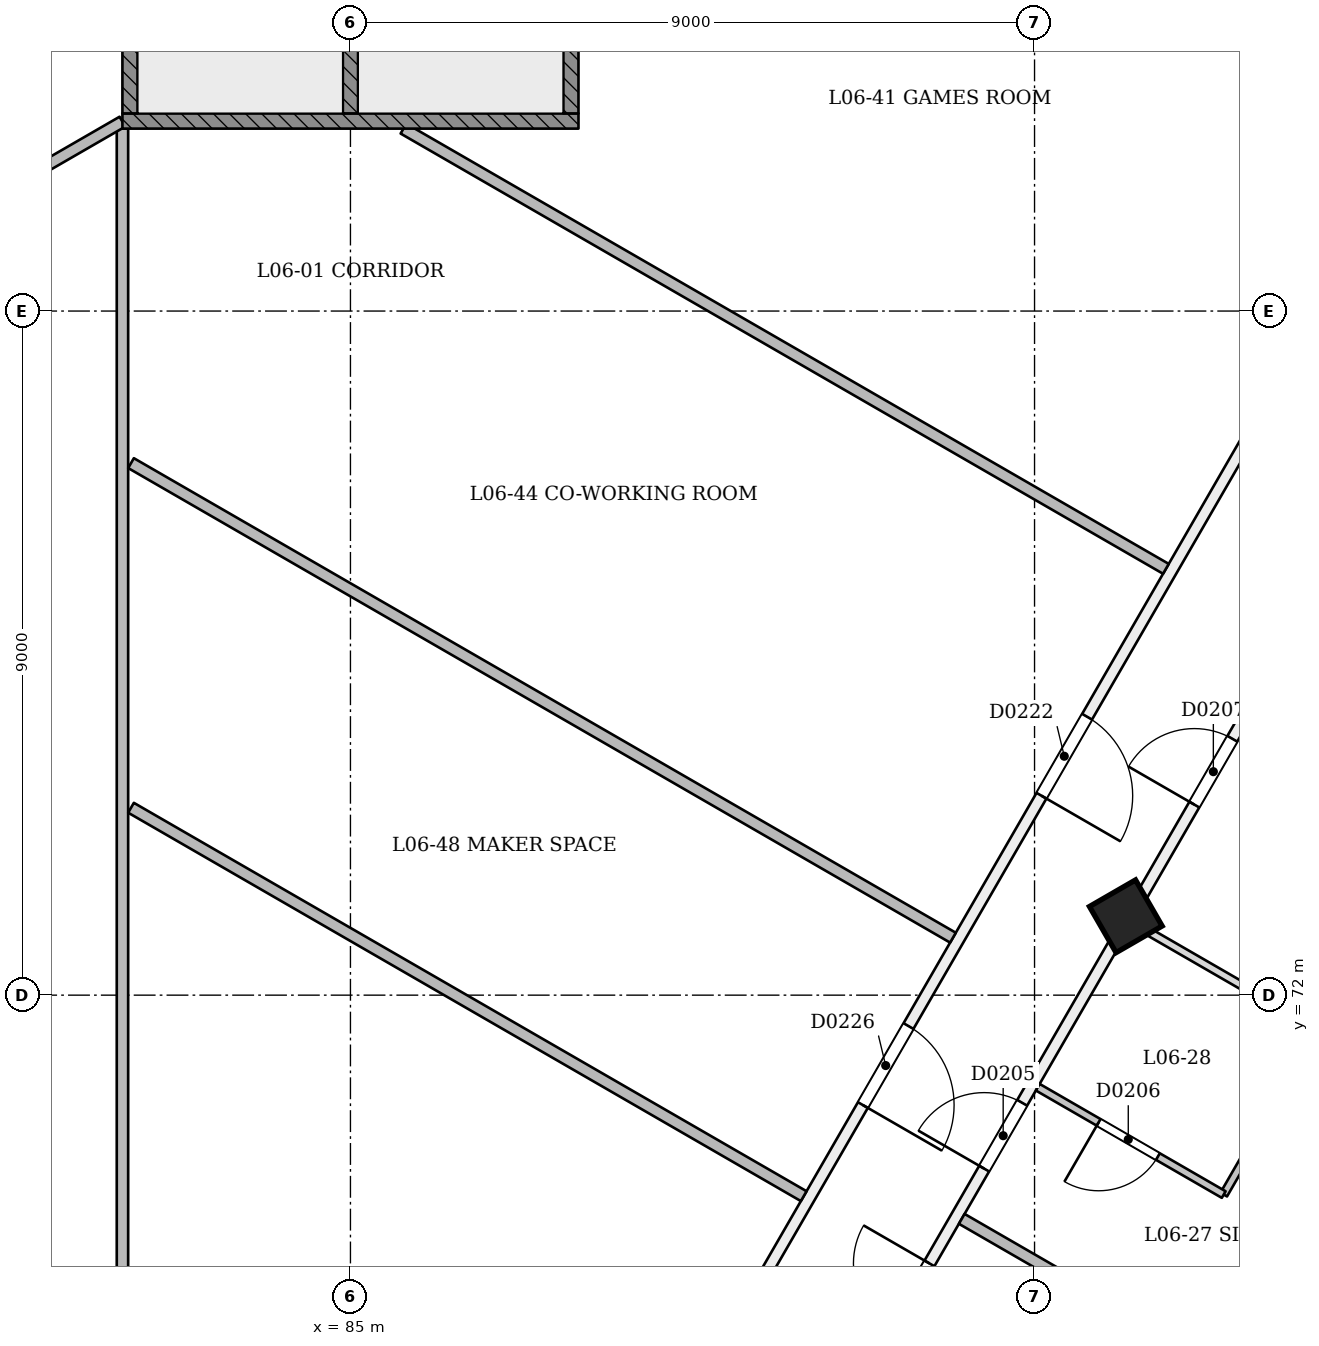
"""IFC4 building model, lengths in metres.
Left out: names, types, materials, properties, quantities, classifications, styles, units other than length and angle.
Written with IfcOpenShell. Run it as: python <this file> out.ifc"""

import sys

from ifc_helpers import new_model, si_unit, direction, frame, frame_2d, origin, origin_2d, place, context, subcontext, project, spatial, rectangle, extrude, element, fill, save


model = new_model("IFC4")
c1 = context("Model", 3, precision=1e-05, world=origin(), true_north=direction((0.0, 1.0)))
c2 = subcontext(c1, "Body", "Model", "MODEL_VIEW")
j1 = project(units=[si_unit("LENGTHUNIT", "METRE"), si_unit("PLANEANGLEUNIT", "RADIAN")], contexts=[c1])
p1 = place(None, origin())
s1 = spatial("IfcSite", under=j1, at=p1, CompositionType="ELEMENT")
p2 = place(p1, origin())
s2 = spatial("IfcBuilding", under=s1, at=p2, CompositionType="ELEMENT")
p3 = place(p2, frame((0.0, 0.0, 30.6)))
s3 = spatial("IfcBuildingStorey", under=s2, at=p3, CompositionType="ELEMENT", Elevation=30.6)
p4 = place(p3, frame((95.228, 72.991, -0.021), z_axis=(-0.02215519141, 0.038415882353, 0.999016199807), x_axis=(-0.500657429676, -0.865361475843, 0.022173277538)))
e1 = element("IfcColumn", 1, at=p4, inside=s3, PredefinedType="COLUMN", context=c2, shape_type="SweptSolid", body=[
    extrude(rectangle(XDim=0.7, YDim=0.7, at=origin_2d()), origin(), (0.0, 0.0, 1.0), 3.604),
])
p5 = place(p3, frame((61.273, 96.374, 0.0), z_axis=(0.0, 0.0, 1.0), x_axis=(0.5000018851, -0.866024315419, 0.0)))
e2 = element("IfcWall", 2, at=p5, inside=s3, PredefinedType="PARTITIONING", context=c2, shape_type="SweptSolid", body=[
    extrude(rectangle(XDim=45.0, YDim=0.15, at=frame_2d((22.5, 0.0))), origin(), (0.0, 0.0, 1.0), 2.7),
])
p6 = place(p5, frame((2.829, 0.0, 0.0)))
e3 = element("IfcOpeningElement", 3, at=p6, cuts=e2, PredefinedType="OPENING", context=c2, shape_type="SweptSolid", body=[
    extrude(rectangle(XDim=1.1, YDim=2.1, at=frame_2d((0.55, 1.05))), frame((0.0, 0.085, 0.0), z_axis=(0.0, -1.0, 0.0), x_axis=(1.0, 0.0, 0.0)), (0.0, 0.0, 1.0), 0.171),
])
p7 = place(p5, frame((7.3, 0.0, 0.0)))
e4 = element("IfcOpeningElement", 4, at=p7, cuts=e2, PredefinedType="OPENING", context=c2, shape_type="SweptSolid", body=[
    extrude(rectangle(XDim=1.2, YDim=2.1, at=frame_2d((0.6, 1.05))), frame((0.0, 0.085, 0.0), z_axis=(0.0, -1.0, 0.0), x_axis=(1.0, 0.0, 0.0)), (0.0, 0.0, 1.0), 0.171),
])
p8 = place(p5, frame((14.22, 0.0, 0.0)))
e5 = element("IfcOpeningElement", 5, at=p8, cuts=e2, PredefinedType="OPENING", context=c2, shape_type="SweptSolid", body=[
    extrude(rectangle(XDim=1.0, YDim=2.1, at=frame_2d((0.5, 1.05))), frame((0.0, 0.085, 0.0), z_axis=(0.0, -1.0, 0.0), x_axis=(1.0, 0.0, 0.0)), (0.0, 0.0, 1.0), 0.171),
])
p9 = place(p5, frame((20.895, 0.0, 0.0)))
e6 = element("IfcOpeningElement", 6, at=p9, cuts=e2, PredefinedType="OPENING", context=c2, shape_type="SweptSolid", body=[
    extrude(rectangle(XDim=1.0, YDim=2.1, at=frame_2d((0.5, 1.05))), frame((0.0, 0.085, 0.0), z_axis=(0.0, -1.0, 0.0), x_axis=(1.0, 0.0, 0.0)), (0.0, 0.0, 1.0), 0.171),
])
p10 = place(p5, frame((24.25, 0.0, 0.0)))
e7 = element("IfcOpeningElement", 7, at=p10, cuts=e2, PredefinedType="OPENING", context=c2, shape_type="SweptSolid", body=[
    extrude(rectangle(XDim=1.0, YDim=2.1, at=frame_2d((0.5, 1.05))), frame((0.0, 0.085, 0.0), z_axis=(0.0, -1.0, 0.0), x_axis=(1.0, 0.0, 0.0)), (0.0, 0.0, 1.0), 0.171),
])
p11 = place(p5, frame((29.78, 0.0, 0.0)))
e8 = element("IfcOpeningElement", 8, at=p11, cuts=e2, PredefinedType="OPENING", context=c2, shape_type="SweptSolid", body=[
    extrude(rectangle(XDim=1.0, YDim=2.1, at=frame_2d((0.5, 1.05))), frame((0.0, 0.085, 0.0), z_axis=(0.0, -1.0, 0.0), x_axis=(1.0, 0.0, 0.0)), (0.0, 0.0, 1.0), 0.171),
])
p12 = place(p5, frame((34.3, 0.0, 0.0)))
e9 = element("IfcOpeningElement", 9, at=p12, cuts=e2, PredefinedType="OPENING", context=c2, shape_type="SweptSolid", body=[
    extrude(rectangle(XDim=1.2, YDim=2.1, at=frame_2d((0.6, 1.05))), frame((0.0, 0.085, 0.0), z_axis=(0.0, -1.0, 0.0), x_axis=(1.0, 0.0, 0.0)), (0.0, 0.0, 1.0), 0.171),
])
p13 = place(p5, frame((41.22, 0.0, 0.0)))
e10 = element("IfcOpeningElement", 10, at=p13, cuts=e2, PredefinedType="OPENING", context=c2, shape_type="SweptSolid", body=[
    extrude(rectangle(XDim=1.0, YDim=2.1, at=frame_2d((0.5, 1.05))), frame((0.0, 0.085, 0.0), z_axis=(0.0, -1.0, 0.0), x_axis=(1.0, 0.0, 0.0)), (0.0, 0.0, 1.0), 0.171),
])
p14 = place(p3, frame((86.227, 57.403, 0.0), z_axis=(0.0, 0.0, 1.0), x_axis=(0.5000018851, 0.866024315419, 0.0)))
e11 = element("IfcWall", 11, at=p14, inside=s3, PredefinedType="PARTITIONING", context=c2, shape_type="SweptSolid", body=[
    extrude(rectangle(XDim=45.0, YDim=0.15, at=frame_2d((22.5, 0.0))), origin(), (0.0, 0.0, 1.0), 2.7),
])
p15 = place(p14, frame((0.72, 0.0, 0.0)))
e12 = element("IfcOpeningElement", 12, at=p15, cuts=e11, PredefinedType="OPENING", context=c2, shape_type="SweptSolid", body=[
    extrude(rectangle(XDim=1.0, YDim=2.1, at=frame_2d((0.5, 1.05))), frame((0.0, 0.085, 0.0), z_axis=(0.0, -1.0, 0.0), x_axis=(1.0, 0.0, 0.0)), (0.0, 0.0, 1.0), 0.171),
])
p16 = place(p14, frame((5.22, 0.0, 0.0)))
e13 = element("IfcOpeningElement", 13, at=p16, cuts=e11, PredefinedType="OPENING", context=c2, shape_type="SweptSolid", body=[
    extrude(rectangle(XDim=1.0, YDim=2.1, at=frame_2d((0.5, 1.05))), frame((0.0, 0.085, 0.0), z_axis=(0.0, -1.0, 0.0), x_axis=(1.0, 0.0, 0.0)), (0.0, 0.0, 1.0), 0.171),
])
p17 = place(p14, frame((11.78, 0.0, 0.0)))
e14 = element("IfcOpeningElement", 14, at=p17, cuts=e11, PredefinedType="OPENING", context=c2, shape_type="SweptSolid", body=[
    extrude(rectangle(XDim=1.0, YDim=2.1, at=frame_2d((0.5, 1.05))), frame((0.0, 0.085, 0.0), z_axis=(0.0, -1.0, 0.0), x_axis=(1.0, 0.0, 0.0)), (0.0, 0.0, 1.0), 0.171),
])
p18 = place(p14, frame((14.22, 0.0, 0.0)))
e15 = element("IfcOpeningElement", 15, at=p18, cuts=e11, PredefinedType="OPENING", context=c2, shape_type="SweptSolid", body=[
    extrude(rectangle(XDim=1.0, YDim=2.1, at=frame_2d((0.5, 1.05))), frame((0.0, 0.085, 0.0), z_axis=(0.0, -1.0, 0.0), x_axis=(1.0, 0.0, 0.0)), (0.0, 0.0, 1.0), 0.171),
])
p19 = place(p14, frame((19.75, 0.0, 0.0)))
e16 = element("IfcOpeningElement", 16, at=p19, cuts=e11, PredefinedType="OPENING", context=c2, shape_type="SweptSolid", body=[
    extrude(rectangle(XDim=1.0, YDim=2.1, at=frame_2d((0.5, 1.05))), frame((0.0, 0.085, 0.0), z_axis=(0.0, -1.0, 0.0), x_axis=(1.0, 0.0, 0.0)), (0.0, 0.0, 1.0), 0.171),
])
p20 = place(p14, frame((23.105, 0.0, 0.0)))
e17 = element("IfcOpeningElement", 17, at=p20, cuts=e11, PredefinedType="OPENING", context=c2, shape_type="SweptSolid", body=[
    extrude(rectangle(XDim=1.0, YDim=2.1, at=frame_2d((0.5, 1.05))), frame((0.0, 0.085, 0.0), z_axis=(0.0, -1.0, 0.0), x_axis=(1.0, 0.0, 0.0)), (0.0, 0.0, 1.0), 0.171),
])
p21 = place(p14, frame((28.75, 0.0, 0.0)))
e18 = element("IfcOpeningElement", 18, at=p21, cuts=e11, PredefinedType="OPENING", context=c2, shape_type="SweptSolid", body=[
    extrude(rectangle(XDim=1.0, YDim=2.1, at=frame_2d((0.5, 1.05))), frame((0.0, 0.085, 0.0), z_axis=(0.0, -1.0, 0.0), x_axis=(1.0, 0.0, 0.0)), (0.0, 0.0, 1.0), 0.171),
])
p22 = place(p14, frame((32.105, 0.0, 0.0)))
e19 = element("IfcOpeningElement", 19, at=p22, cuts=e11, PredefinedType="OPENING", context=c2, shape_type="SweptSolid", body=[
    extrude(rectangle(XDim=1.0, YDim=2.1, at=frame_2d((0.5, 1.05))), frame((0.0, 0.085, 0.0), z_axis=(0.0, -1.0, 0.0), x_axis=(1.0, 0.0, 0.0)), (0.0, 0.0, 1.0), 0.171),
])
p23 = place(p14, frame((36.504, 0.0, 0.0)))
e20 = element("IfcOpeningElement", 20, at=p23, cuts=e11, PredefinedType="OPENING", context=c2, shape_type="SweptSolid", body=[
    extrude(rectangle(XDim=1.0, YDim=2.1, at=frame_2d((0.5, 1.05))), frame((0.0, 0.085, 0.0), z_axis=(0.0, -1.0, 0.0), x_axis=(1.0, 0.0, 0.0)), (0.0, 0.0, 1.0), 0.171),
])
p24 = place(p14, frame((38.654, 0.0, 0.0)))
e21 = element("IfcOpeningElement", 21, at=p24, cuts=e11, PredefinedType="OPENING", context=c2, shape_type="SweptSolid", body=[
    extrude(rectangle(XDim=1.0, YDim=2.1, at=frame_2d((0.5, 1.05))), frame((0.0, 0.085, 0.0), z_axis=(0.0, -1.0, 0.0), x_axis=(1.0, 0.0, 0.0)), (0.0, 0.0, 1.0), 0.171),
])
p25 = place(p14, frame((41.071, 0.0, 0.0)))
e22 = element("IfcOpeningElement", 22, at=p25, cuts=e11, PredefinedType="OPENING", context=c2, shape_type="SweptSolid", body=[
    extrude(rectangle(XDim=1.1, YDim=2.1, at=frame_2d((0.55, 1.05))), frame((0.0, 0.085, 0.0), z_axis=(0.0, -1.0, 0.0), x_axis=(1.0, 0.0, 0.0)), (0.0, 0.0, 1.0), 0.171),
])
p26 = place(p3, frame((103.315, 90.6, 0.0), z_axis=(0.0, 0.0, 1.0), x_axis=(-0.499999056994, -0.866025948229, 0.0)))
e23 = element("IfcWall", 23, at=p26, inside=s3, PredefinedType="PARTITIONING", context=c2, shape_type="SweptSolid", body=[
    extrude(rectangle(XDim=36.292, YDim=0.15, at=frame_2d((18.146, 0.0))), origin(), (0.0, 0.0, 1.0), 3.1),
])
p27 = place(p26, frame((10.576, 0.0, 0.0)))
e24 = element("IfcOpeningElement", 24, at=p27, cuts=e23, PredefinedType="OPENING", context=c2, shape_type="SweptSolid", body=[
    extrude(rectangle(XDim=1.2, YDim=2.1, at=frame_2d((0.6, 1.05))), frame((0.0, 0.085, 0.0), z_axis=(0.0, -1.0, 0.0), x_axis=(1.0, 0.0, 0.0)), (0.0, 0.0, 1.0), 0.171),
])
p28 = place(p26, frame((28.59, 0.0, 0.0)))
e25 = element("IfcOpeningElement", 25, at=p28, cuts=e23, PredefinedType="OPENING", context=c2, shape_type="SweptSolid", body=[
    extrude(rectangle(XDim=1.2, YDim=2.1, at=frame_2d((0.6, 1.05))), frame((0.0, 0.085, 0.0), z_axis=(0.0, -1.0, 0.0), x_axis=(1.0, 0.0, 0.0)), (0.0, 0.0, 1.0), 0.171),
])
p29 = place(p26, frame((17.248, 0.0, 0.0)))
e26 = element("IfcOpeningElement", 26, at=p29, cuts=e23, PredefinedType="OPENING", context=c2, shape_type="SweptSolid", body=[
    extrude(rectangle(XDim=1.2, YDim=2.1, at=frame_2d((0.6, 1.05))), frame((0.0, 0.085, 0.0), z_axis=(0.0, -1.0, 0.0), x_axis=(1.0, 0.0, 0.0)), (0.0, 0.0, 1.0), 0.171),
])
p30 = place(p26, frame((4.5, 0.0, 0.0)))
e27 = element("IfcOpeningElement", 27, at=p30, cuts=e23, PredefinedType="OPENING", context=c2, shape_type="SweptSolid", body=[
    extrude(rectangle(XDim=1.2, YDim=2.1, at=frame_2d((0.6, 1.05))), frame((0.0, 0.085, 0.0), z_axis=(0.0, -1.0, 0.0), x_axis=(1.0, 0.0, 0.0)), (0.0, 0.0, 1.0), 0.171),
])
p31 = place(p26, frame((21.947, 0.0, 0.0)))
e28 = element("IfcOpeningElement", 28, at=p31, cuts=e23, PredefinedType="OPENING", context=c2, shape_type="SweptSolid", body=[
    extrude(rectangle(XDim=1.2, YDim=2.1, at=frame_2d((0.6, 1.05))), frame((0.0, 0.085, 0.0), z_axis=(0.0, -1.0, 0.0), x_axis=(1.0, 0.0, 0.0)), (0.0, 0.0, 1.0), 0.171),
])
p32 = place(p3, frame((84.831, 59.171, 0.0), z_axis=(0.0, 0.0, 1.0), x_axis=(-0.499999056994, 0.866025948229, 0.0)))
e29 = element("IfcWall", 29, at=p32, inside=s3, PredefinedType="PARTITIONING", context=c2, shape_type="SweptSolid", body=[
    extrude(rectangle(XDim=36.292, YDim=0.15, at=frame_2d((18.146, 0.0))), origin(), (0.0, 0.0, 1.0), 3.1),
])
p33 = place(p32, frame((16.276, 0.0, 0.0)))
e30 = element("IfcOpeningElement", 30, at=p33, cuts=e29, PredefinedType="OPENING", context=c2, shape_type="SweptSolid", body=[
    extrude(rectangle(XDim=1.2, YDim=2.1, at=frame_2d((0.6, 1.05))), frame((0.0, 0.085, 0.0), z_axis=(0.0, -1.0, 0.0), x_axis=(1.0, 0.0, 0.0)), (0.0, 0.0, 1.0), 0.171),
])
p34 = place(p32, frame((27.931, 0.0, 0.0)))
e31 = element("IfcOpeningElement", 31, at=p34, cuts=e29, PredefinedType="OPENING", context=c2, shape_type="SweptSolid", body=[
    extrude(rectangle(XDim=1.2, YDim=2.1, at=frame_2d((0.6, 1.05))), frame((0.0, 0.085, 0.0), z_axis=(0.0, -1.0, 0.0), x_axis=(1.0, 0.0, 0.0)), (0.0, 0.0, 1.0), 0.171),
])
p35 = place(p3, frame((98.537, 65.884, 0.0), z_axis=(0.0, 0.0, 1.0), x_axis=(-0.866025401434, 0.500000004071, 0.0)))
e32 = element("IfcWall", 32, at=p35, inside=s3, PredefinedType="PARTITIONING", context=c2, shape_type="SweptSolid", body=[
    extrude(rectangle(XDim=6.345, YDim=0.15, at=frame_2d((3.173, 0.0))), origin(), (0.0, 0.0, 1.0), 2.6),
])
p36 = place(p3, frame((97.701, 71.477, 0.0), z_axis=(0.0, 0.0, 1.0), x_axis=(-0.500047793048, -0.865997808697, 0.0)))
e33 = element("IfcWall", 33, at=p36, inside=s3, PredefinedType="PARTITIONING", context=c2, shape_type="SweptSolid", body=[
    extrude(rectangle(XDim=2.425, YDim=0.1, at=frame_2d((1.212, 0.0))), origin(), (0.0, 0.0, 1.0), 2.7),
])
p37 = place(p3, frame((96.489, 69.376, 0.0), z_axis=(0.0, 0.0, 1.0), x_axis=(-0.866048868473, 0.499959355765, 0.0)))
e34 = element("IfcWall", 34, at=p37, inside=s3, PredefinedType="PARTITIONING", context=c2, shape_type="SweptSolid", body=[
    extrude(rectangle(XDim=2.825, YDim=0.1, at=frame_2d((1.413, 0.0))), origin(), (0.0, 0.0, 1.0), 3.1),
])
p38 = place(p37, frame((1.0, 0.0, 0.0)))
e35 = element("IfcOpeningElement", 35, at=p38, cuts=e34, PredefinedType="OPENING", context=c2, shape_type="SweptSolid", body=[
    extrude(rectangle(XDim=0.9, YDim=2.1, at=frame_2d((0.45, 1.05))), frame((0.0, 0.061, 0.0), z_axis=(0.0, -1.0, 0.0), x_axis=(1.0, 0.0, 0.0)), (0.0, 0.0, 1.0), 0.121),
])
p39 = place(p3, frame((97.756, 71.531, 0.0), z_axis=(0.0, 0.0, 1.0), x_axis=(-0.866048401274, 0.499960165064, 0.0)))
e36 = element("IfcWall", 36, at=p39, inside=s3, PredefinedType="PARTITIONING", context=c2, shape_type="SweptSolid", body=[
    extrude(rectangle(XDim=2.845, YDim=0.1, at=frame_2d((1.422, 0.0))), origin(), (0.0, 0.0, 1.0), 2.7),
])
p40 = place(p3, frame((85.698, 83.4, 0.0), z_axis=(0.0, 0.0, 1.0), x_axis=(0.866020254168, -0.500008919292, 0.0)))
e37 = element("IfcWall", 37, at=p40, inside=s3, PredefinedType="PARTITIONING", context=c2, shape_type="SweptSolid", body=[
    extrude(rectangle(XDim=11.582, YDim=0.15, at=frame_2d((5.791, 0.0))), origin(), (0.0, 0.0, 1.0), 3.1),
])
p41 = place(p3, frame((99.425, 84.012, 0.0), z_axis=(0.0, 0.0, 1.0), x_axis=(-0.866028468914, 0.499994691002, 0.0)))
e38 = element("IfcWall", 38, at=p41, inside=s3, PredefinedType="PARTITIONING", context=c2, shape_type="SweptSolid", body=[
    extrude(rectangle(XDim=12.912, YDim=0.15, at=frame_2d((6.456, 0.0))), origin(), (0.0, 0.0, 1.0), 3.1),
])
p42 = place(p3, frame((82.0, 64.352, 0.0), z_axis=(0.0, 0.0, 1.0), x_axis=(0.0, 1.0, 0.0)))
e39 = element("IfcWall", 39, at=p42, inside=s3, PredefinedType="PARTITIONING", context=c2, shape_type="SweptSolid", body=[
    extrude(rectangle(XDim=19.048, YDim=0.15, at=frame_2d((9.524, 0.0))), origin(), (0.0, 0.0, 1.0), 3.1),
])
p43 = place(p3, frame((82.0, 83.491, 0.0), z_axis=(0.0, 0.0, 1.0), x_axis=(-0.866018469749, -0.500012009909, 0.0)))
e40 = element("IfcWall", 40, at=p43, inside=s3, PredefinedType="PARTITIONING", context=c2, shape_type="SweptSolid", body=[
    extrude(rectangle(XDim=9.634, YDim=0.15, at=frame_2d((4.817, 0.0))), origin(), (0.0, 0.0, 1.0), 3.1),
])
p44 = place(p3, frame((90.963, 69.356, 0.0), z_axis=(0.0, 0.0, 1.0), x_axis=(-0.866024858179, 0.500000945016, 0.0)))
e41 = element("IfcWall", 41, at=p44, inside=s3, PredefinedType="PARTITIONING", context=c2, shape_type="SweptSolid", body=[
    extrude(rectangle(XDim=10.219, YDim=0.15, at=frame_2d((5.11, 0.0))), origin(), (0.0, 0.0, 1.0), 3.1),
])
p45 = place(p3, frame((82.113, 78.999, 0.0), z_axis=(0.0, 0.0, 1.0), x_axis=(0.866025387892, -0.500000027526, 0.0)))
e42 = element("IfcWall", 42, at=p45, inside=s3, PredefinedType="PARTITIONING", context=c2, shape_type="SweptSolid", body=[
    extrude(rectangle(XDim=12.486, YDim=0.15, at=frame_2d((6.243, 0.0))), origin(), (0.0, 0.0, 1.0), 3.1),
])
p46 = place(p3, frame((82.0, 83.5, 0.0), z_axis=(0.0, 0.0, 1.0), x_axis=(1.0, 0.0, 0.0)))
e43 = element("IfcWall", 43, at=p46, inside=s3, PredefinedType="SOLIDWALL", context=c2, shape_type="SweptSolid", body=[
    extrude(rectangle(XDim=6.0, YDim=0.2, at=frame_2d((3.0, 0.0))), origin(), (0.0, 0.0, 1.0), 3.1),
])
for number, where, z_axis, x_axis in (
    (44, (82.1, 83.6, 0.0), (0.0, 0.0, 1.0), (0.0, 1.0, 0.0)),
    (45, (87.9, 83.6, 0.0), (0.0, 0.0, 1.0), (0.0, 1.0, 0.0)),
    (46, (85.0, 83.6, 0.0), (0.0, 0.0, 1.0), (0.0, 1.0, 0.0)),
):
    element("IfcWall", number, at=place(p3, frame(where, z_axis=z_axis, x_axis=x_axis)), inside=s3, PredefinedType="SOLIDWALL", context=c2, shape_type="SweptSolid", body=[
        extrude(rectangle(XDim=6.8, YDim=0.2, at=frame_2d((3.4, 0.0))), origin(), (0.0, 0.0, 1.0), 3.1),
    ])
p47 = place(p17, origin())
e47 = element("IfcDoor", 47, at=p47, inside=s3, OperationType="SINGLE_SWING_RIGHT", PredefinedType="NOTDEFINED", context=c2, shape_type="SweptSolid", body=[
    extrude(rectangle(XDim=1.0, YDim=2.1, at=frame_2d((0.5, 1.05))), frame((0.0, 0.025, 0.0), z_axis=(0.0, -1.0, 0.0), x_axis=(1.0, 0.0, 0.0)), (0.0, 0.0, 1.0), 0.05),
])
fill(e14, e47)
p48 = place(p18, origin())
e48 = element("IfcDoor", 48, at=p48, inside=s3, OperationType="SINGLE_SWING_LEFT", PredefinedType="NOTDEFINED", context=c2, shape_type="SweptSolid", body=[
    extrude(rectangle(XDim=1.0, YDim=2.1, at=frame_2d((0.5, 1.05))), frame((0.0, 0.025, 0.0), z_axis=(0.0, -1.0, 0.0), x_axis=(1.0, 0.0, 0.0)), (0.0, 0.0, 1.0), 0.05),
])
fill(e15, e48)
p49 = place(p38, origin())
e49 = element("IfcDoor", 49, at=p49, inside=s3, OperationType="SINGLE_SWING_RIGHT", PredefinedType="NOTDEFINED", context=c2, shape_type="SweptSolid", body=[
    extrude(rectangle(XDim=0.9, YDim=2.1, at=frame_2d((0.45, 1.05))), frame((0.0, 0.025, 0.0), z_axis=(0.0, -1.0, 0.0), x_axis=(1.0, 0.0, 0.0)), (0.0, 0.0, 1.0), 0.05),
])
fill(e35, e49)
p50 = place(p19, origin())
e50 = element("IfcDoor", 50, at=p50, inside=s3, OperationType="SINGLE_SWING_LEFT", PredefinedType="NOTDEFINED", context=c2, shape_type="SweptSolid", body=[
    extrude(rectangle(XDim=1.0, YDim=2.1, at=frame_2d((0.5, 1.05))), frame((0.0, 0.025, 0.0), z_axis=(0.0, -1.0, 0.0), x_axis=(1.0, 0.0, 0.0)), (0.0, 0.0, 1.0), 0.05),
])
fill(e16, e50)
p51 = place(p29, origin())
e51 = element("IfcDoor", 51, at=p51, inside=s3, OperationType="SINGLE_SWING_RIGHT", PredefinedType="NOTDEFINED", context=c2, shape_type="SweptSolid", body=[
    extrude(rectangle(XDim=1.2, YDim=2.1, at=frame_2d((0.6, 1.05))), frame((0.0, 0.025, 0.0), z_axis=(0.0, -1.0, 0.0), x_axis=(1.0, 0.0, 0.0)), (0.0, 0.0, 1.0), 0.05),
])
fill(e26, e51)
p52 = place(p31, origin())
e52 = element("IfcDoor", 52, at=p52, inside=s3, OperationType="SINGLE_SWING_RIGHT", PredefinedType="NOTDEFINED", context=c2, shape_type="SweptSolid", body=[
    extrude(rectangle(XDim=1.2, YDim=2.1, at=frame_2d((0.6, 1.05))), frame((0.0, 0.025, 0.0), z_axis=(0.0, -1.0, 0.0), x_axis=(1.0, 0.0, 0.0)), (0.0, 0.0, 1.0), 0.05),
])
fill(e28, e52)
save(model, sys.argv[1])
